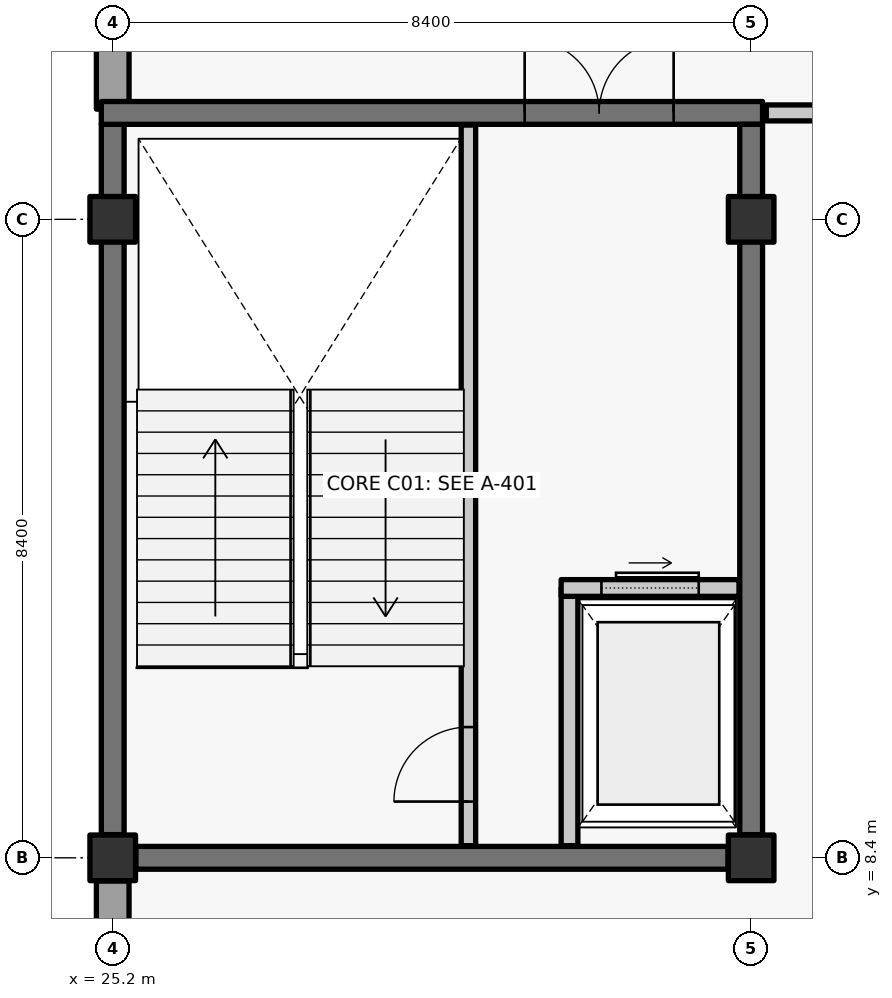
"""IFC4 building model, lengths in metres.
Left out: names, types, materials, properties, quantities, classifications, styles, units other than length and angle.
Written with IfcOpenShell. Run it as: python <this file> out.ifc"""

import sys

from ifc_helpers import new_model, si_unit, direction, frame, frame_2d, origin, origin_2d, place, context, subcontext, project, spatial, rectangle, extrude, element, fill, save


model = new_model("IFC4")
c1 = context("Model", 3, precision=1e-05, world=origin(), true_north=direction((0.0, 1.0)))
c2 = subcontext(c1, "Body", "Model", "MODEL_VIEW")
j1 = project(units=[si_unit("LENGTHUNIT", "METRE"), si_unit("PLANEANGLEUNIT", "RADIAN")], contexts=[c1])
p1 = place(None, origin())
s1 = spatial("IfcSite", under=j1, at=p1, CompositionType="ELEMENT")
p2 = place(p1, origin())
s2 = spatial("IfcBuilding", under=s1, at=p2, CompositionType="ELEMENT")
p3 = place(p2, frame((0.0, 0.0, 16.2)))
s3 = spatial("IfcBuildingStorey", under=s2, at=p3, CompositionType="ELEMENT", Elevation=16.2)
for number, where, z_axis, x_axis in (
    (1, (25.2, 8.4, 0.0), (0.0, 0.0, 1.0), (1.0, 0.0, 0.0)),
    (2, (25.2, 16.8, 0.0), (0.0, 0.0, 1.0), (1.0, 0.0, 0.0)),
    (3, (33.6, 8.4, 0.0), (0.0, 0.0, 1.0), (1.0, 0.0, 0.0)),
    (4, (33.6, 16.8, 0.0), (0.0, 0.0, 1.0), (1.0, 0.0, 0.0)),
):
    element("IfcColumn", number, at=place(p3, frame(where, z_axis=z_axis, x_axis=x_axis)), inside=s3, PredefinedType="COLUMN", context=c2, shape_type="SweptSolid", body=[
        extrude(rectangle(XDim=0.6, YDim=0.6, at=origin_2d()), origin(), (0.0, 0.0, 1.0), 4.26),
    ])
p4 = place(p3, frame((25.2, 0.28, 0.0), z_axis=(0.0, 0.0, 1.0), x_axis=(0.0, 1.0, 0.0)))
e5 = element("IfcWall", 5, at=p4, inside=s3, PredefinedType="SOLIDWALL", context=c2, shape_type="SweptSolid", body=[
    extrude(rectangle(XDim=7.815, YDim=0.43, at=frame_2d((3.907, 0.0))), origin(), (0.0, 0.0, 1.0), 4.26),
])
p5 = place(p4, frame((2.945, 0.0, 0.95)))
e6 = element("IfcOpeningElement", 6, at=p5, cuts=e5, PredefinedType="OPENING", context=c2, shape_type="SweptSolid", body=[
    extrude(rectangle(XDim=1.95, YDim=2.05, at=frame_2d((0.975, 1.025))), frame((0.0, 0.225, 0.0), z_axis=(0.0, -1.0, 0.0), x_axis=(1.0, 0.0, 0.0)), (0.0, 0.0, 1.0), 0.45),
])
p6 = place(p3, frame((25.2, 18.25, 0.0), z_axis=(0.0, 0.0, 1.0), x_axis=(0.0, 1.0, 0.0)))
e7 = element("IfcWall", 7, at=p6, inside=s3, PredefinedType="SOLIDWALL", context=c2, shape_type="SweptSolid", body=[
    extrude(rectangle(XDim=6.645, YDim=0.43, at=frame_2d((3.323, 0.0))), origin(), (0.0, 0.0, 1.0), 4.26),
])
p7 = place(p6, frame((2.275, 0.0, 0.95)))
e8 = element("IfcOpeningElement", 8, at=p7, cuts=e7, PredefinedType="OPENING", context=c2, shape_type="SweptSolid", body=[
    extrude(rectangle(XDim=1.95, YDim=2.05, at=frame_2d((0.975, 1.025))), frame((0.0, 0.225, 0.0), z_axis=(0.0, -1.0, 0.0), x_axis=(1.0, 0.0, 0.0)), (0.0, 0.0, 1.0), 0.45),
])
p8 = place(p3, frame((33.295, 8.4, 0.0), z_axis=(0.0, 0.0, 1.0), x_axis=(-1.0, 0.0, 0.0)))
e9 = element("IfcWall", 9, at=p8, inside=s3, PredefinedType="SHEAR", context=c2, shape_type="SweptSolid", body=[
    extrude(rectangle(XDim=7.79, YDim=0.3, at=frame_2d((3.895, 0.0))), origin(), (0.0, 0.0, 1.0), 4.26),
])
p9 = place(p3, frame((25.2, 8.705, 0.0), z_axis=(0.0, 0.0, 1.0), x_axis=(0.0, 1.0, 0.0)))
e10 = element("IfcWall", 10, at=p9, inside=s3, PredefinedType="SHEAR", context=c2, shape_type="SweptSolid", body=[
    extrude(rectangle(XDim=9.345, YDim=0.3, at=frame_2d((4.672, 0.0))), origin(), (0.0, 0.0, 1.0), 4.26),
])
p10 = place(p3, frame((25.05, 18.2, 0.0), z_axis=(0.0, 0.0, 1.0), x_axis=(1.0, 0.0, 0.0)))
e11 = element("IfcWall", 11, at=p10, inside=s3, PredefinedType="SHEAR", context=c2, shape_type="SweptSolid", body=[
    extrude(rectangle(XDim=8.7, YDim=0.3, at=frame_2d((4.35, 0.0))), origin(), (0.0, 0.0, 1.0), 4.26),
])
p11 = place(p10, frame((5.57, 0.0, 0.0)))
e12 = element("IfcOpeningElement", 12, at=p11, cuts=e11, PredefinedType="OPENING", context=c2, shape_type="SweptSolid", body=[
    extrude(rectangle(XDim=1.96, YDim=2.2, at=frame_2d((0.98, 1.1))), frame((0.0, 0.16, 0.0), z_axis=(0.0, -1.0, 0.0), x_axis=(1.0, 0.0, 0.0)), (0.0, 0.0, 1.0), 0.32),
])
p12 = place(p3, frame((33.6, 18.05, 0.0), z_axis=(0.0, 0.0, 1.0), x_axis=(0.0, -1.0, 0.0)))
e13 = element("IfcWall", 13, at=p12, inside=s3, PredefinedType="SHEAR", context=c2, shape_type="SweptSolid", body=[
    extrude(rectangle(XDim=9.345, YDim=0.3, at=frame_2d((4.672, 0.0))), origin(), (0.0, 0.0, 1.0), 4.26),
])
p13 = place(p3, frame((29.88, 8.56, 0.0), z_axis=(0.0, 0.0, 1.0), x_axis=(0.0, 1.0, 0.0)))
e14 = element("IfcWall", 14, at=p13, inside=s3, PredefinedType="SOLIDWALL", context=c2, shape_type="SweptSolid", body=[
    extrude(rectangle(XDim=9.48, YDim=0.19, at=frame_2d((4.74, 0.0))), origin(), (0.0, 0.0, 1.0), 4.26),
])
p14 = place(p13, frame((0.58, 0.0, 0.0)))
e15 = element("IfcOpeningElement", 15, at=p14, cuts=e14, PredefinedType="OPENING", context=c2, shape_type="SweptSolid", body=[
    extrude(rectangle(XDim=0.98, YDim=2.15, at=frame_2d((0.49, 1.075))), frame((0.0, 0.105, 0.0), z_axis=(0.0, -1.0, 0.0), x_axis=(1.0, 0.0, 0.0)), (0.0, 0.0, 1.0), 0.21),
])
p15 = place(p3, frame((31.21, 8.56, 0.0), z_axis=(0.0, 0.0, 1.0), x_axis=(0.0, 1.0, 0.0)))
e16 = element("IfcWall", 16, at=p15, inside=s3, PredefinedType="SOLIDWALL", context=c2, shape_type="SweptSolid", body=[
    extrude(rectangle(XDim=3.39, YDim=0.22, at=frame_2d((1.695, 0.0))), origin(), (0.0, 0.0, 1.0), 4.26),
])
p16 = place(p3, frame((31.1, 11.95, 0.0), z_axis=(0.0, 0.0, 1.0), x_axis=(1.0, 0.0, 0.0)))
e17 = element("IfcWall", 17, at=p16, inside=s3, PredefinedType="SOLIDWALL", context=c2, shape_type="SweptSolid", body=[
    extrude(rectangle(XDim=2.34, YDim=0.22, at=frame_2d((1.17, 0.0))), origin(), (0.0, 0.0, 1.0), 4.26),
])
p17 = place(p16, frame((0.53, 0.0, 0.0)))
e18 = element("IfcOpeningElement", 18, at=p17, cuts=e17, PredefinedType="OPENING", context=c2, shape_type="SweptSolid", body=[
    extrude(rectangle(XDim=1.28, YDim=2.25, at=frame_2d((0.64, 1.125))), frame((0.0, 0.12, 0.0), z_axis=(0.0, -1.0, 0.0), x_axis=(1.0, 0.0, 0.0)), (0.0, 0.0, 1.0), 0.24),
])
p18 = place(p3, frame((33.8, 18.2, 0.0), z_axis=(0.0, 0.0, 1.0), x_axis=(1.0, 0.0, 0.0)))
e19 = element("IfcWall", 19, at=p18, inside=s3, PredefinedType="PARTITIONING", context=c2, shape_type="SweptSolid", body=[
    extrude(rectangle(XDim=33.2, YDim=0.21, at=frame_2d((16.6, 0.0))), origin(), (0.0, 0.0, 1.0), 4.26),
])
p19 = place(p18, frame((3.5, 0.0, 0.0)))
e20 = element("IfcOpeningElement", 20, at=p19, cuts=e19, PredefinedType="OPENING", context=c2, shape_type="SweptSolid", body=[
    extrude(rectangle(XDim=1.0, YDim=2.15, at=frame_2d((0.5, 1.075))), frame((0.0, 0.115, 0.0), z_axis=(0.0, -1.0, 0.0), x_axis=(1.0, 0.0, 0.0)), (0.0, 0.0, 1.0), 0.23),
])
p20 = place(p18, frame((20.3, 0.0, 0.0)))
e21 = element("IfcOpeningElement", 21, at=p20, cuts=e19, PredefinedType="OPENING", context=c2, shape_type="SweptSolid", body=[
    extrude(rectangle(XDim=1.0, YDim=2.15, at=frame_2d((0.5, 1.075))), frame((0.0, 0.115, 0.0), z_axis=(0.0, -1.0, 0.0), x_axis=(1.0, 0.0, 0.0)), (0.0, 0.0, 1.0), 0.23),
])
p21 = place(p14, origin())
e22 = element("IfcDoor", 22, at=p21, inside=s3, OperationType="SINGLE_SWING_LEFT", PredefinedType="DOOR", context=c2, shape_type="SweptSolid", body=[
    extrude(rectangle(XDim=0.98, YDim=2.15, at=frame_2d((0.49, 1.075))), frame((0.0, 0.025, 0.0), z_axis=(0.0, -1.0, 0.0), x_axis=(1.0, 0.0, 0.0)), (0.0, 0.0, 1.0), 0.05),
])
fill(e15, e22)
p22 = place(p11, origin())
e23 = element("IfcDoor", 23, at=p22, inside=s3, OperationType="DOUBLE_DOOR_SINGLE_SWING", PredefinedType="DOOR", context=c2, shape_type="SweptSolid", body=[
    extrude(rectangle(XDim=1.96, YDim=2.2, at=frame_2d((0.98, 1.1))), frame((0.0, 0.025, 0.0), z_axis=(0.0, -1.0, 0.0), x_axis=(1.0, 0.0, 0.0)), (0.0, 0.0, 1.0), 0.05),
])
fill(e12, e23)
p23 = place(p17, origin())
e24 = element("IfcDoor", 24, at=p23, inside=s3, OperationType="SLIDING_TO_RIGHT", PredefinedType="DOOR", context=c2, shape_type="SweptSolid", body=[
    extrude(rectangle(XDim=1.28, YDim=2.25, at=frame_2d((0.64, 1.125))), frame((0.0, 0.025, 0.0), z_axis=(0.0, -1.0, 0.0), x_axis=(1.0, 0.0, 0.0)), (0.0, 0.0, 1.0), 0.05),
])
fill(e18, e24)
save(model, sys.argv[1])
